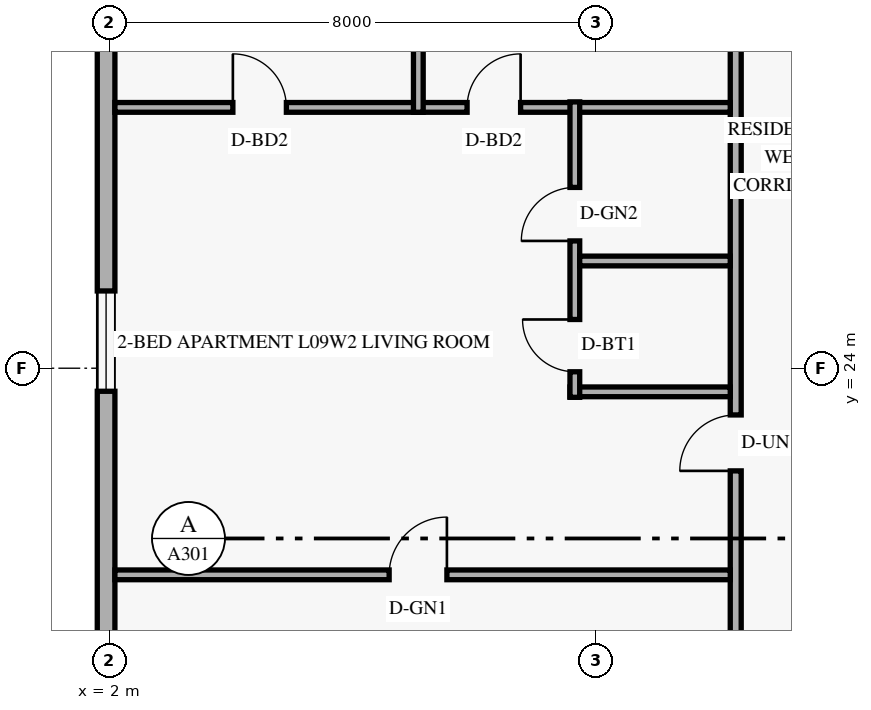
"""IFC4 building model, lengths in metres.
Left out: names, types, materials, properties, quantities, classifications, styles, units other than length and angle.
Written with IfcOpenShell. Run it as: python <this file> out.ifc"""

import sys

from ifc_helpers import new_model, si_unit, direction, frame, frame_2d, origin, place, context, subcontext, project, spatial, rectangle, extrude, element, fill, save


model = new_model("IFC4")
c1 = context("Model", 3, precision=1e-05, world=origin(), true_north=direction((0.0, 1.0)))
c2 = subcontext(c1, "Body", "Model", "MODEL_VIEW")
j1 = project(units=[si_unit("LENGTHUNIT", "METRE"), si_unit("PLANEANGLEUNIT", "RADIAN")], contexts=[c1])
p1 = place(None, origin())
s1 = spatial("IfcSite", under=j1, at=p1, CompositionType="ELEMENT")
p2 = place(p1, origin())
s2 = spatial("IfcBuilding", under=s1, at=p2, CompositionType="ELEMENT")
p3 = place(p2, frame((0.0, 0.0, 38.4)))
s3 = spatial("IfcBuildingStorey", under=s2, at=p3, CompositionType="ELEMENT", Elevation=38.4)
p4 = place(p3, frame((1.945, 43.38, 0.0), z_axis=(0.0, 0.0, 1.0), x_axis=(0.0, -1.0, 0.0)))
e1 = element("IfcWall", 1, at=p4, inside=s3, PredefinedType="SOLIDWALL", context=c2, shape_type="SweptSolid", body=[
    extrude(rectangle(XDim=38.76, YDim=0.29, at=frame_2d((19.38, 0.0))), origin(), (0.0, 0.0, 1.0), 3.36),
])
p5 = place(p4, frame((33.975, 0.0, 0.85)))
e2 = element("IfcOpeningElement", 2, at=p5, cuts=e1, PredefinedType="OPENING", context=c2, shape_type="SweptSolid", body=[
    extrude(rectangle(XDim=1.65, YDim=1.6, at=frame_2d((0.825, 0.8))), frame((0.0, 0.155, 0.0), z_axis=(0.0, -1.0, 0.0), x_axis=(1.0, 0.0, 0.0)), (0.0, 0.0, 1.0), 0.31),
])
p6 = place(p4, frame((27.965, 0.0, 0.85)))
e3 = element("IfcOpeningElement", 3, at=p6, cuts=e1, PredefinedType="OPENING", context=c2, shape_type="SweptSolid", body=[
    extrude(rectangle(XDim=1.65, YDim=1.6, at=frame_2d((0.825, 0.8))), frame((0.0, 0.155, 0.0), z_axis=(0.0, -1.0, 0.0), x_axis=(1.0, 0.0, 0.0)), (0.0, 0.0, 1.0), 0.31),
])
p7 = place(p4, frame((23.934, 0.0, 0.85)))
e4 = element("IfcOpeningElement", 4, at=p7, cuts=e1, PredefinedType="OPENING", context=c2, shape_type="SweptSolid", body=[
    extrude(rectangle(XDim=1.65, YDim=1.6, at=frame_2d((0.825, 0.8))), frame((0.0, 0.155, 0.0), z_axis=(0.0, -1.0, 0.0), x_axis=(1.0, 0.0, 0.0)), (0.0, 0.0, 1.0), 0.31),
])
p8 = place(p4, frame((18.109, 0.0, 0.85)))
e5 = element("IfcOpeningElement", 5, at=p8, cuts=e1, PredefinedType="OPENING", context=c2, shape_type="SweptSolid", body=[
    extrude(rectangle(XDim=1.65, YDim=1.6, at=frame_2d((0.825, 0.8))), frame((0.0, 0.155, 0.0), z_axis=(0.0, -1.0, 0.0), x_axis=(1.0, 0.0, 0.0)), (0.0, 0.0, 1.0), 0.31),
])
p9 = place(p4, frame((12.27, 0.0, 0.85)))
e6 = element("IfcOpeningElement", 6, at=p9, cuts=e1, PredefinedType="OPENING", context=c2, shape_type="SweptSolid", body=[
    extrude(rectangle(XDim=1.65, YDim=1.6, at=frame_2d((0.825, 0.8))), frame((0.0, 0.155, 0.0), z_axis=(0.0, -1.0, 0.0), x_axis=(1.0, 0.0, 0.0)), (0.0, 0.0, 1.0), 0.31),
])
p10 = place(p4, frame((7.33, 0.0, 0.85)))
e7 = element("IfcOpeningElement", 7, at=p10, cuts=e1, PredefinedType="OPENING", context=c2, shape_type="SweptSolid", body=[
    extrude(rectangle(XDim=1.65, YDim=1.6, at=frame_2d((0.825, 0.8))), frame((0.0, 0.155, 0.0), z_axis=(0.0, -1.0, 0.0), x_axis=(1.0, 0.0, 0.0)), (0.0, 0.0, 1.0), 0.31),
])
p11 = place(p4, frame((1.78, 0.0, 0.85)))
e8 = element("IfcOpeningElement", 8, at=p11, cuts=e1, PredefinedType="OPENING", context=c2, shape_type="SweptSolid", body=[
    extrude(rectangle(XDim=1.65, YDim=1.6, at=frame_2d((0.825, 0.8))), frame((0.0, 0.155, 0.0), z_axis=(0.0, -1.0, 0.0), x_axis=(1.0, 0.0, 0.0)), (0.0, 0.0, 1.0), 0.31),
])
p12 = place(p3, frame((12.3, 1.29, 0.0), z_axis=(0.0, 0.0, 1.0), x_axis=(0.0, 1.0, 0.0)))
e9 = element("IfcWall", 9, at=p12, inside=s3, PredefinedType="STANDARD", context=c2, shape_type="SweptSolid", body=[
    extrude(rectangle(XDim=45.42, YDim=0.18, at=frame_2d((22.71, 0.0))), origin(), (0.0, 0.0, 1.0), 2.649),
])
p13 = place(p12, frame((8.06, 0.0, 0.0)))
e10 = element("IfcOpeningElement", 10, at=p13, cuts=e9, PredefinedType="OPENING", context=c2, shape_type="SweptSolid", body=[
    extrude(rectangle(XDim=0.92, YDim=2.15, at=frame_2d((0.46, 1.075))), frame((0.0, 0.1, 0.0), z_axis=(0.0, -1.0, 0.0), x_axis=(1.0, 0.0, 0.0)), (0.0, 0.0, 1.0), 0.2),
])
p14 = place(p12, frame((21.021, 0.0, 0.0)))
e11 = element("IfcOpeningElement", 11, at=p14, cuts=e9, PredefinedType="OPENING", context=c2, shape_type="SweptSolid", body=[
    extrude(rectangle(XDim=0.92, YDim=2.15, at=frame_2d((0.46, 1.075))), frame((0.0, 0.1, 0.0), z_axis=(0.0, -1.0, 0.0), x_axis=(1.0, 0.0, 0.0)), (0.0, 0.0, 1.0), 0.2),
])
p15 = place(p12, frame((35.99, 0.0, 0.0)))
e12 = element("IfcOpeningElement", 12, at=p15, cuts=e9, PredefinedType="OPENING", context=c2, shape_type="SweptSolid", body=[
    extrude(rectangle(XDim=0.92, YDim=2.15, at=frame_2d((0.46, 1.075))), frame((0.0, 0.1, 0.0), z_axis=(0.0, -1.0, 0.0), x_axis=(1.0, 0.0, 0.0)), (0.0, 0.0, 1.0), 0.2),
])
p16 = place(p3, frame((2.09, 28.29, 0.0), z_axis=(0.0, 0.0, 1.0), x_axis=(1.0, 0.0, 0.0)))
e13 = element("IfcWall", 13, at=p16, inside=s3, PredefinedType="PARTITIONING", context=c2, shape_type="SweptSolid", body=[
    extrude(rectangle(XDim=10.12, YDim=0.16, at=frame_2d((5.06, 0.0))), origin(), (0.0, 0.0, 1.0), 2.649),
])
p17 = place(p16, frame((1.94, 0.0, 0.0)))
e14 = element("IfcOpeningElement", 14, at=p17, cuts=e13, PredefinedType="OPENING", context=c2, shape_type="SweptSolid", body=[
    extrude(rectangle(XDim=0.88, YDim=2.14, at=frame_2d((0.44, 1.07))), frame((0.0, 0.09, 0.0), z_axis=(0.0, -1.0, 0.0), x_axis=(1.0, 0.0, 0.0)), (0.0, 0.0, 1.0), 0.18),
])
p18 = place(p16, frame((5.792, 0.0, 0.0)))
e15 = element("IfcOpeningElement", 15, at=p18, cuts=e13, PredefinedType="OPENING", context=c2, shape_type="SweptSolid", body=[
    extrude(rectangle(XDim=0.88, YDim=2.14, at=frame_2d((0.44, 1.07))), frame((0.0, 0.09, 0.0), z_axis=(0.0, -1.0, 0.0), x_axis=(1.0, 0.0, 0.0)), (0.0, 0.0, 1.0), 0.18),
])
p19 = place(p3, frame((9.574, 23.612, 0.0), z_axis=(0.0, 0.0, 1.0), x_axis=(1.0, 0.0, 0.0)))
e16 = element("IfcWall", 16, at=p19, inside=s3, PredefinedType="PLUMBINGWALL", context=c2, shape_type="SweptSolid", body=[
    extrude(rectangle(XDim=2.636, YDim=0.16, at=frame_2d((1.318, 0.0))), origin(), (0.0, 0.0, 1.0), 2.649),
])
p20 = place(p3, frame((9.654, 23.521, 0.0), z_axis=(0.0, 0.0, 1.0), x_axis=(0.0, 1.0, 0.0)))
e17 = element("IfcWall", 17, at=p20, inside=s3, PredefinedType="PLUMBINGWALL", context=c2, shape_type="SweptSolid", body=[
    extrude(rectangle(XDim=4.858, YDim=0.16, at=frame_2d((2.429, 0.0))), origin(), (0.0, 0.0, 1.0), 3.36),
])
p21 = place(p20, frame((0.42, 0.0, 0.0)))
e18 = element("IfcOpeningElement", 18, at=p21, cuts=e17, PredefinedType="OPENING", context=c2, shape_type="SweptSolid", body=[
    extrude(rectangle(XDim=0.86, YDim=2.12, at=frame_2d((0.43, 1.06))), frame((0.0, 0.09, 0.0), z_axis=(0.0, -1.0, 0.0), x_axis=(1.0, 0.0, 0.0)), (0.0, 0.0, 1.0), 0.18),
])
p22 = place(p20, frame((2.572, 0.0, 0.0)))
e19 = element("IfcOpeningElement", 19, at=p22, cuts=e17, PredefinedType="OPENING", context=c2, shape_type="SweptSolid", body=[
    extrude(rectangle(XDim=0.88, YDim=2.12, at=frame_2d((0.44, 1.06))), frame((0.0, 0.09, 0.0), z_axis=(0.0, -1.0, 0.0), x_axis=(1.0, 0.0, 0.0)), (0.0, 0.0, 1.0), 0.18),
])
p23 = place(p3, frame((9.734, 25.764, 0.0), z_axis=(0.0, 0.0, 1.0), x_axis=(1.0, 0.0, 0.0)))
e20 = element("IfcWall", 20, at=p23, inside=s3, PredefinedType="PLUMBINGWALL", context=c2, shape_type="SweptSolid", body=[
    extrude(rectangle(XDim=2.476, YDim=0.16, at=frame_2d((1.238, 0.0))), origin(), (0.0, 0.0, 1.0), 2.649),
])
p24 = place(p3, frame((2.09, 20.602, 0.0), z_axis=(0.0, 0.0, 1.0), x_axis=(1.0, 0.0, 0.0)))
e21 = element("IfcWall", 21, at=p24, inside=s3, PredefinedType="PARTITIONING", context=c2, shape_type="SweptSolid", body=[
    extrude(rectangle(XDim=10.12, YDim=0.16, at=frame_2d((5.06, 0.0))), origin(), (0.0, 0.0, 1.0), 2.649),
])
p25 = place(p24, frame((4.51, 0.0, 0.0)))
e22 = element("IfcOpeningElement", 22, at=p25, cuts=e21, PredefinedType="OPENING", context=c2, shape_type="SweptSolid", body=[
    extrude(rectangle(XDim=0.95, YDim=2.15, at=frame_2d((0.475, 1.075))), frame((0.0, 0.09, 0.0), z_axis=(0.0, -1.0, 0.0), x_axis=(1.0, 0.0, 0.0)), (0.0, 0.0, 1.0), 0.18),
])
p26 = place(p3, frame((7.08, 28.21, 0.0), z_axis=(0.0, 0.0, 1.0), x_axis=(0.0, 1.0, 0.0)))
e23 = element("IfcWall", 23, at=p26, inside=s3, PredefinedType="PARTITIONING", context=c2, shape_type="SweptSolid", body=[
    extrude(rectangle(XDim=4.46, YDim=0.16, at=frame_2d((2.23, 0.0))), origin(), (0.0, 0.0, 1.0), 2.649),
])
p27 = place(p8, origin())
e24 = element("IfcWindow", 24, at=p27, inside=s3, PartitioningType="SINGLE_PANEL", PredefinedType="WINDOW", context=c2, shape_type="SweptSolid", body=[
    extrude(rectangle(XDim=1.65, YDim=1.6, at=frame_2d((0.825, 0.8))), frame((0.0, 0.03, 0.0), z_axis=(0.0, -1.0, 0.0), x_axis=(1.0, 0.0, 0.0)), (0.0, 0.0, 1.0), 0.06),
])
fill(e5, e24)
p28 = place(p25, origin())
e25 = element("IfcDoor", 25, at=p28, inside=s3, OperationType="SINGLE_SWING_RIGHT", PredefinedType="DOOR", context=c2, shape_type="SweptSolid", body=[
    extrude(rectangle(XDim=0.95, YDim=2.15, at=frame_2d((0.475, 1.075))), frame((0.0, 0.025, 0.0), z_axis=(0.0, -1.0, 0.0), x_axis=(1.0, 0.0, 0.0)), (0.0, 0.0, 1.0), 0.05),
])
fill(e22, e25)
p29 = place(p14, origin())
e26 = element("IfcDoor", 26, at=p29, inside=s3, OperationType="SINGLE_SWING_LEFT", PredefinedType="DOOR", context=c2, shape_type="SweptSolid", body=[
    extrude(rectangle(XDim=0.92, YDim=2.15, at=frame_2d((0.46, 1.075))), frame((0.0, 0.025, 0.0), z_axis=(0.0, -1.0, 0.0), x_axis=(1.0, 0.0, 0.0)), (0.0, 0.0, 1.0), 0.05),
])
fill(e11, e26)
p30 = place(p21, origin())
e27 = element("IfcDoor", 27, at=p30, inside=s3, OperationType="SINGLE_SWING_RIGHT", PredefinedType="DOOR", context=c2, shape_type="SweptSolid", body=[
    extrude(rectangle(XDim=0.86, YDim=2.12, at=frame_2d((0.43, 1.06))), frame((0.0, 0.025, 0.0), z_axis=(0.0, -1.0, 0.0), x_axis=(1.0, 0.0, 0.0)), (0.0, 0.0, 1.0), 0.05),
])
fill(e18, e27)
p31 = place(p22, origin())
e28 = element("IfcDoor", 28, at=p31, inside=s3, OperationType="SINGLE_SWING_LEFT", PredefinedType="DOOR", context=c2, shape_type="SweptSolid", body=[
    extrude(rectangle(XDim=0.88, YDim=2.12, at=frame_2d((0.44, 1.06))), frame((0.0, 0.025, 0.0), z_axis=(0.0, -1.0, 0.0), x_axis=(1.0, 0.0, 0.0)), (0.0, 0.0, 1.0), 0.05),
])
fill(e19, e28)
p32 = place(p17, origin())
e29 = element("IfcDoor", 29, at=p32, inside=s3, OperationType="SINGLE_SWING_LEFT", PredefinedType="DOOR", context=c2, shape_type="SweptSolid", body=[
    extrude(rectangle(XDim=0.88, YDim=2.14, at=frame_2d((0.44, 1.07))), frame((0.0, 0.025, 0.0), z_axis=(0.0, -1.0, 0.0), x_axis=(1.0, 0.0, 0.0)), (0.0, 0.0, 1.0), 0.05),
])
fill(e14, e29)
p33 = place(p18, origin())
e30 = element("IfcDoor", 30, at=p33, inside=s3, OperationType="SINGLE_SWING_RIGHT", PredefinedType="DOOR", context=c2, shape_type="SweptSolid", body=[
    extrude(rectangle(XDim=0.88, YDim=2.14, at=frame_2d((0.44, 1.07))), frame((0.0, 0.025, 0.0), z_axis=(0.0, -1.0, 0.0), x_axis=(1.0, 0.0, 0.0)), (0.0, 0.0, 1.0), 0.05),
])
fill(e15, e30)
save(model, sys.argv[1])
